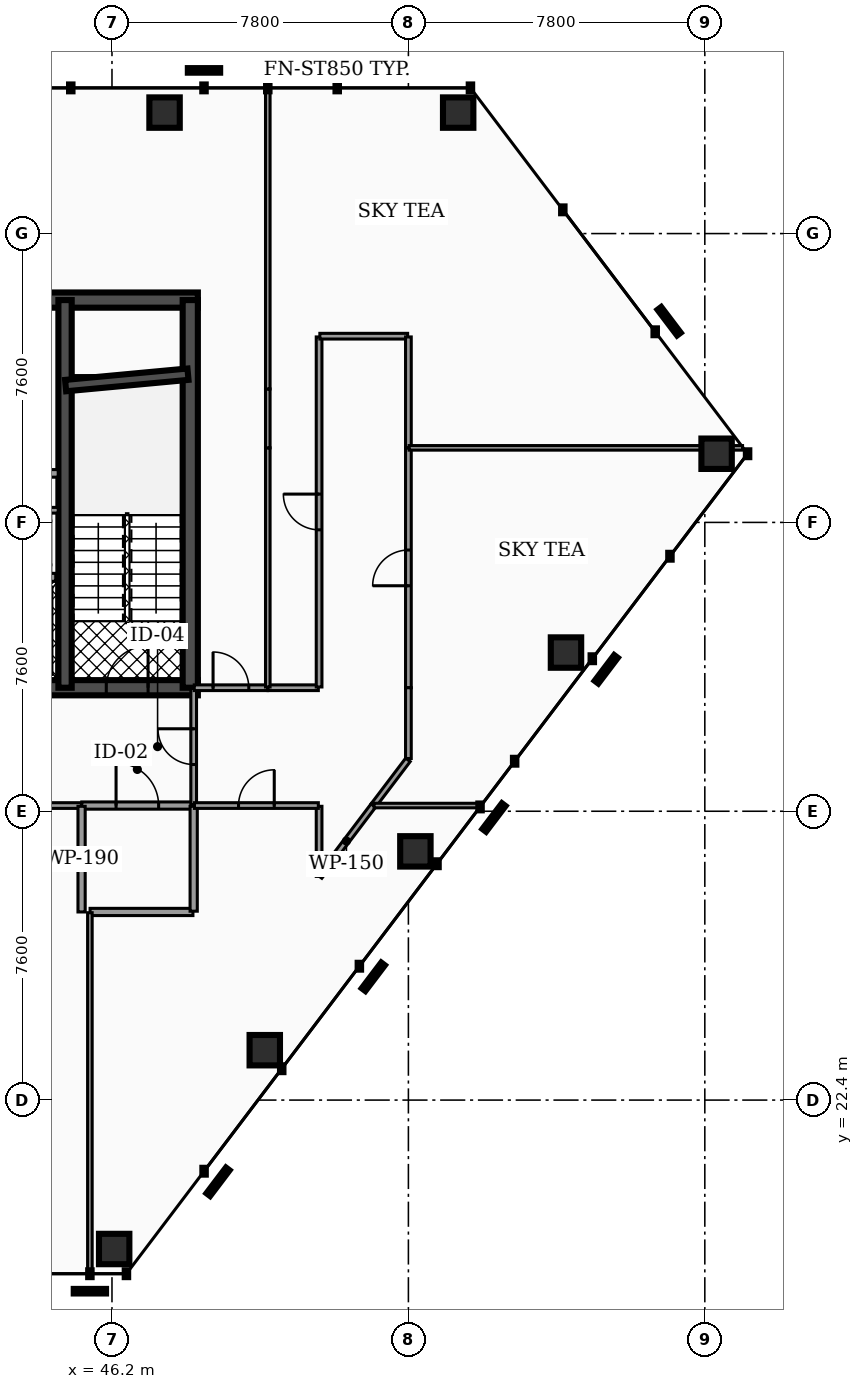
"""IFC4 building model, lengths in metres.
Left out: names, types, materials, properties, quantities, classifications, styles, units other than length and angle.
Written with IfcOpenShell. Run it as: python <this file> out.ifc"""

import sys

from ifc_helpers import new_model, si_unit, direction, frame, frame_2d, origin, origin_2d, place, context, subcontext, project, spatial, rectangle, hollow_rectangle, extrude, element, fill, save


model = new_model("IFC4")
c1 = context("Model", 3, precision=1e-05, world=origin(), true_north=direction((0.0, 1.0)))
c2 = subcontext(c1, "Body", "Model", "MODEL_VIEW")
j1 = project(units=[si_unit("LENGTHUNIT", "METRE"), si_unit("PLANEANGLEUNIT", "RADIAN")], contexts=[c1])
p1 = place(None, origin())
s1 = spatial("IfcSite", under=j1, at=p1, CompositionType="ELEMENT")
p2 = place(p1, origin())
s2 = spatial("IfcBuilding", under=s1, at=p2, CompositionType="ELEMENT")
p3 = place(p2, frame((0.0, 0.0, 153.34)))
s3 = spatial("IfcBuildingStorey", under=s2, at=p3, CompositionType="ELEMENT", Elevation=153.34)
p4 = place(p3, frame((28.4, 43.45, 0.0), z_axis=(0.0, 0.0, 1.0), x_axis=(1.0, 0.0, 0.0)))
e1 = element("IfcWall", 1, at=p4, inside=s3, PredefinedType="SHEAR", context=c2, shape_type="SweptSolid", body=[
    extrude(rectangle(XDim=20.06, YDim=0.4, at=frame_2d((10.03, 0.0))), origin(), (0.0, 0.0, 1.0), 3.5),
])
p5 = place(p3, frame((28.4, 33.25, 0.0), z_axis=(0.0, 0.0, 1.0), x_axis=(1.0, 0.0, 0.0)))
e2 = element("IfcWall", 2, at=p5, inside=s3, PredefinedType="SHEAR", context=c2, shape_type="SweptSolid", body=[
    extrude(rectangle(XDim=20.06, YDim=0.4, at=frame_2d((10.03, 0.0))), origin(), (0.0, 0.0, 1.0), 3.5),
])
p6 = place(p5, frame((4.03, 0.0, 0.0)))
e3 = element("IfcOpeningElement", 3, at=p6, cuts=e2, PredefinedType="OPENING", context=c2, shape_type="SweptSolid", body=[
    extrude(rectangle(XDim=1.1, YDim=2.15, at=frame_2d((0.55, 1.075))), frame((0.0, 0.21, 0.0), z_axis=(0.0, -1.0, 0.0), x_axis=(1.0, 0.0, 0.0)), (0.0, 0.0, 1.0), 0.42),
])
p7 = place(p5, frame((14.87, 0.0, 0.0)))
e4 = element("IfcOpeningElement", 4, at=p7, cuts=e2, PredefinedType="OPENING", context=c2, shape_type="SweptSolid", body=[
    extrude(rectangle(XDim=1.1, YDim=2.15, at=frame_2d((0.55, 1.075))), frame((0.0, 0.21, 0.0), z_axis=(0.0, -1.0, 0.0), x_axis=(1.0, 0.0, 0.0)), (0.0, 0.0, 1.0), 0.42),
])
p8 = place(p5, frame((5.95, 0.0, 0.0)))
e5 = element("IfcOpeningElement", 5, at=p8, cuts=e2, PredefinedType="OPENING", context=c2, shape_type="SweptSolid", body=[
    extrude(rectangle(XDim=1.0, YDim=2.1, at=frame_2d((0.5, 1.05))), frame((0.0, 0.21, 0.0), z_axis=(0.0, -1.0, 0.0), x_axis=(1.0, 0.0, 0.0)), (0.0, 0.0, 1.0), 0.42),
])
p9 = place(p5, frame((7.65, 0.0, 0.0)))
e6 = element("IfcOpeningElement", 6, at=p9, cuts=e2, PredefinedType="OPENING", context=c2, shape_type="SweptSolid", body=[
    extrude(rectangle(XDim=1.0, YDim=2.1, at=frame_2d((0.5, 1.05))), frame((0.0, 0.21, 0.0), z_axis=(0.0, -1.0, 0.0), x_axis=(1.0, 0.0, 0.0)), (0.0, 0.0, 1.0), 0.42),
])
p10 = place(p5, frame((1.31, 0.0, 0.0)))
e7 = element("IfcOpeningElement", 7, at=p10, cuts=e2, PredefinedType="OPENING", context=c2, shape_type="SweptSolid", body=[
    extrude(rectangle(XDim=1.1, YDim=2.2, at=frame_2d((0.55, 1.1))), frame((0.0, 0.21, 0.0), z_axis=(0.0, -1.0, 0.0), x_axis=(1.0, 0.0, 0.0)), (0.0, 0.0, 1.0), 0.42),
])
p11 = place(p5, frame((9.44, 0.0, 0.0)))
e8 = element("IfcOpeningElement", 8, at=p11, cuts=e2, PredefinedType="OPENING", context=c2, shape_type="SweptSolid", body=[
    extrude(rectangle(XDim=1.12, YDim=2.05, at=frame_2d((0.56, 1.025))), frame((0.0, 0.21, 0.0), z_axis=(0.0, -1.0, 0.0), x_axis=(1.0, 0.0, 0.0)), (0.0, 0.0, 1.0), 0.42),
])
p12 = place(p5, frame((17.65, 0.0, 0.0)))
e9 = element("IfcOpeningElement", 9, at=p12, cuts=e2, PredefinedType="OPENING", context=c2, shape_type="SweptSolid", body=[
    extrude(rectangle(XDim=1.1, YDim=2.2, at=frame_2d((0.55, 1.1))), frame((0.0, 0.21, 0.0), z_axis=(0.0, -1.0, 0.0), x_axis=(1.0, 0.0, 0.0)), (0.0, 0.0, 1.0), 0.42),
])
p13 = place(p3, frame((44.965, 33.25, 0.0), z_axis=(0.0, 0.0, 1.0), x_axis=(0.0, 1.0, 0.0)))
e10 = element("IfcWall", 10, at=p13, inside=s3, PredefinedType="SHEAR", context=c2, shape_type="SweptSolid", body=[
    extrude(rectangle(XDim=10.2, YDim=0.35, at=frame_2d((5.1, 0.0))), origin(), (0.0, 0.0, 1.0), 3.5),
])
p14 = place(p3, frame((48.26, 33.25, 0.0), z_axis=(0.0, 0.0, 1.0), x_axis=(0.0, 1.0, 0.0)))
e11 = element("IfcWall", 11, at=p14, inside=s3, PredefinedType="SHEAR", context=c2, shape_type="SweptSolid", body=[
    extrude(rectangle(XDim=10.2, YDim=0.4, at=frame_2d((5.1, 0.0))), origin(), (0.0, 0.0, 1.0), 3.5),
])
p15 = place(p3, frame((44.98, 41.2, 0.0), z_axis=(0.0, 0.0, 1.0), x_axis=(0.995686468965, 0.09278176286, 0.0)))
e12 = element("IfcWall", 12, at=p15, inside=s3, PredefinedType="SHEAR", context=c2, shape_type="SweptSolid", body=[
    extrude(rectangle(XDim=3.234, YDim=0.3, at=frame_2d((1.617, 0.0))), origin(), (0.0, 0.0, 1.0), 3.5),
])
p16 = place(p3, frame((55.31, 48.383, 0.0), z_axis=(0.122881872253, -0.033166309959, 0.991866947405), x_axis=(0.260579473479, 0.965452400692, 0.0)))
e13 = element("IfcColumn", 13, at=p16, inside=s3, PredefinedType="COLUMN", context=c2, shape_type="SweptSolid", body=[
    extrude(hollow_rectangle(XDim=0.8, YDim=0.8, WallThickness=0.04, at=origin_2d()), origin(), (0.0, 0.0, 1.0), 3.519),
])
p17 = place(p3, frame((47.583, 48.383, 0.0), z_axis=(0.057932366005, -0.033363458976, 0.997762857885), x_axis=(0.499059487101, 0.866567728648, 0.0)))
e14 = element("IfcColumn", 14, at=p17, inside=s3, PredefinedType="COLUMN", context=c2, shape_type="SweptSolid", body=[
    extrude(hollow_rectangle(XDim=0.8, YDim=0.8, WallThickness=0.04, at=origin_2d()), origin(), (0.0, 0.0, 1.0), 3.498),
])
p18 = place(p3, frame((46.258, 18.481, 0.0), z_axis=(-0.088935253172, -0.030852245227, 0.995559470704), x_axis=(0.327745748959, -0.944765962575, 0.0)))
e15 = element("IfcColumn", 15, at=p18, inside=s3, PredefinedType="COLUMN", context=c2, shape_type="SweptSolid", body=[
    extrude(hollow_rectangle(XDim=0.8, YDim=0.8, WallThickness=0.04, at=origin_2d()), origin(), (0.0, 0.0, 1.0), 3.506),
])
p19 = place(p3, frame((50.221, 23.713, 0.0), z_axis=(-0.06283418608, 0.003909682689, 0.998016322232), x_axis=(-0.062102120917, -0.998069800454, 0.0)))
e16 = element("IfcColumn", 16, at=p19, inside=s3, PredefinedType="COLUMN", context=c2, shape_type="SweptSolid", body=[
    extrude(hollow_rectangle(XDim=0.8, YDim=0.8, WallThickness=0.04, at=origin_2d()), origin(), (0.0, 0.0, 1.0), 3.497),
])
p20 = place(p3, frame((54.184, 28.944, 0.0), z_axis=(-0.036464506977, 0.03876973443, 0.998582619227), x_axis=(-0.728431141905, -0.685119019954, 0.0)))
e17 = element("IfcColumn", 17, at=p20, inside=s3, PredefinedType="COLUMN", context=c2, shape_type="SweptSolid", body=[
    extrude(hollow_rectangle(XDim=0.8, YDim=0.8, WallThickness=0.04, at=origin_2d()), origin(), (0.0, 0.0, 1.0), 3.495),
])
p21 = place(p3, frame((58.147, 34.176, 0.0), z_axis=(-0.010045726228, 0.073459373045, 0.997247614134), x_axis=(-0.990778565397, -0.135491085866, 0.0)))
e18 = element("IfcColumn", 18, at=p21, inside=s3, PredefinedType="COLUMN", context=c2, shape_type="SweptSolid", body=[
    extrude(hollow_rectangle(XDim=0.8, YDim=0.8, WallThickness=0.04, at=origin_2d()), origin(), (0.0, 0.0, 1.0), 3.5),
])
p22 = place(p3, frame((62.11, 39.407, 0.0), z_axis=(0.01620217777, 0.107852264901, 0.994034897975), x_axis=(-0.988903591842, 0.148558695615, 0.0)))
e19 = element("IfcColumn", 19, at=p22, inside=s3, PredefinedType="COLUMN", context=c2, shape_type="SweptSolid", body=[
    extrude(hollow_rectangle(XDim=0.8, YDim=0.8, WallThickness=0.04, at=origin_2d()), origin(), (0.0, 0.0, 1.0), 3.511),
])
p23 = place(p3, frame((42.92, 36.155, 0.0), z_axis=(0.0, 0.0, 1.0), x_axis=(1.0, 0.0, 0.0)))
e20 = element("IfcWall", 20, at=p23, inside=s3, PredefinedType="SOLIDWALL", context=c2, shape_type="SweptSolid", body=[
    extrude(rectangle(XDim=1.8, YDim=0.21, at=frame_2d((0.9, 0.0))), origin(), (0.0, 0.0, 1.0), 2.472),
])
p24 = place(p3, frame((39.25, 38.89, 0.0), z_axis=(0.0, 0.0, 1.0), x_axis=(1.0, 0.0, 0.0)))
e21 = element("IfcWall", 21, at=p24, inside=s3, PredefinedType="PARTITIONING", context=c2, shape_type="SweptSolid", body=[
    extrude(rectangle(XDim=5.535, YDim=0.2, at=frame_2d((2.768, 0.0))), origin(), (0.0, 0.0, 1.0), 2.447),
])
p25 = place(p24, frame((2.327, 0.0, 0.0)))
e22 = element("IfcOpeningElement", 22, at=p25, cuts=e21, PredefinedType="OPENING", context=c2, shape_type="SweptSolid", body=[
    extrude(rectangle(XDim=0.88, YDim=2.05, at=frame_2d((0.44, 1.025))), frame((0.0, 0.11, 0.0), z_axis=(0.0, -1.0, 0.0), x_axis=(1.0, 0.0, 0.0)), (0.0, 0.0, 1.0), 0.22),
])
p26 = place(p3, frame((41.62, 37.92, 0.0), z_axis=(0.0, 0.0, 1.0), x_axis=(1.0, 0.0, 0.0)))
e23 = element("IfcWall", 23, at=p26, inside=s3, PredefinedType="PARTITIONING", context=c2, shape_type="SweptSolid", body=[
    extrude(rectangle(XDim=3.165, YDim=0.15, at=frame_2d((1.583, 0.0))), origin(), (0.0, 0.0, 1.0), 2.447),
])
p27 = place(p26, frame((0.312, 0.0, 0.0)))
e24 = element("IfcOpeningElement", 24, at=p27, cuts=e23, PredefinedType="OPENING", context=c2, shape_type="SweptSolid", body=[
    extrude(rectangle(XDim=0.94, YDim=2.05, at=frame_2d((0.47, 1.025))), frame((0.0, 0.085, 0.0), z_axis=(0.0, -1.0, 0.0), x_axis=(1.0, 0.0, 0.0)), (0.0, 0.0, 1.0), 0.17),
])
p28 = place(p3, frame((45.405, 30.15, 0.0), z_axis=(0.0, 0.0, 1.0), x_axis=(1.0, 0.0, 0.0)))
e25 = element("IfcWall", 25, at=p28, inside=s3, PredefinedType="PARTITIONING", context=c2, shape_type="SweptSolid", body=[
    extrude(rectangle(XDim=2.925, YDim=0.19, at=frame_2d((1.462, 0.0))), origin(), (0.0, 0.0, 1.0), 2.447),
])
p29 = place(p28, frame((0.903, 0.0, 0.0)))
e26 = element("IfcOpeningElement", 26, at=p29, cuts=e25, PredefinedType="OPENING", context=c2, shape_type="SweptSolid", body=[
    extrude(rectangle(XDim=1.12, YDim=2.05, at=frame_2d((0.56, 1.025))), frame((0.0, 0.105, 0.0), z_axis=(0.0, -1.0, 0.0), x_axis=(1.0, 0.0, 0.0)), (0.0, 0.0, 1.0), 0.21),
])
p30 = place(p3, frame((48.35, 30.17, 0.0), z_axis=(0.0, 0.0, 1.0), x_axis=(0.0, 1.0, 0.0)))
e27 = element("IfcWall", 27, at=p30, inside=s3, PredefinedType="PARTITIONING", context=c2, shape_type="SweptSolid", body=[
    extrude(rectangle(XDim=3.06, YDim=0.15, at=frame_2d((1.53, 0.0))), origin(), (0.0, 0.0, 1.0), 2.447),
])
p31 = place(p30, frame((1.06, 0.0, 0.0)))
e28 = element("IfcOpeningElement", 28, at=p31, cuts=e27, PredefinedType="OPENING", context=c2, shape_type="SweptSolid", body=[
    extrude(rectangle(XDim=0.94, YDim=2.05, at=frame_2d((0.47, 1.025))), frame((0.0, 0.085, 0.0), z_axis=(0.0, -1.0, 0.0), x_axis=(1.0, 0.0, 0.0)), (0.0, 0.0, 1.0), 0.17),
])
p32 = place(p3, frame((35.385, 30.15, 0.0), z_axis=(0.0, 0.0, 1.0), x_axis=(1.0, 0.0, 0.0)))
e29 = element("IfcWall", 29, at=p32, inside=s3, PredefinedType="PARTITIONING", context=c2, shape_type="SweptSolid", body=[
    extrude(rectangle(XDim=10.01, YDim=0.15, at=frame_2d((5.005, 0.0))), origin(), (0.0, 0.0, 1.0), 2.447),
])
p33 = place(p32, frame((7.935, 0.0, 0.0)))
e30 = element("IfcOpeningElement", 30, at=p33, cuts=e29, PredefinedType="OPENING", context=c2, shape_type="SweptSolid", body=[
    extrude(rectangle(XDim=0.94, YDim=2.05, at=frame_2d((0.47, 1.025))), frame((0.0, 0.085, 0.0), z_axis=(0.0, -1.0, 0.0), x_axis=(1.0, 0.0, 0.0)), (0.0, 0.0, 1.0), 0.17),
])
p34 = place(p3, frame((45.4, 27.35, 0.0), z_axis=(0.0, 0.0, 1.0), x_axis=(0.0, 1.0, 0.0)))
e31 = element("IfcWall", 31, at=p34, inside=s3, PredefinedType="PARTITIONING", context=c2, shape_type="SweptSolid", body=[
    extrude(rectangle(XDim=2.78, YDim=0.19, at=frame_2d((1.39, 0.0))), origin(), (0.0, 0.0, 1.0), 2.447),
])
p35 = place(p3, frame((45.624, 27.35, 0.0), z_axis=(0.0, 0.0, 1.0), x_axis=(1.0, 0.0, 0.0)))
e32 = element("IfcWall", 32, at=p35, inside=s3, PredefinedType="PARTITIONING", context=c2, shape_type="SweptSolid", body=[
    extrude(rectangle(XDim=2.706, YDim=0.19, at=frame_2d((1.353, 0.0))), origin(), (0.0, 0.0, 1.0), 2.447),
])
p36 = place(p3, frame((48.35, 27.37, 0.0), z_axis=(0.0, 0.0, 1.0), x_axis=(0.0, 1.0, 0.0)))
e33 = element("IfcWall", 33, at=p36, inside=s3, PredefinedType="PARTITIONING", context=c2, shape_type="SweptSolid", body=[
    extrude(rectangle(XDim=2.76, YDim=0.19, at=frame_2d((1.38, 0.0))), origin(), (0.0, 0.0, 1.0), 2.447),
])
p37 = place(p3, frame((51.662, 28.282, 0.0), z_axis=(0.0, 0.0, 1.0), x_axis=(0.603811538878, 0.797127107504, 0.0)))
e34 = element("IfcWall", 34, at=p37, inside=s3, PredefinedType="PARTITIONING", context=c2, shape_type="SweptSolid", body=[
    extrude(rectangle(XDim=2.343, YDim=0.15, at=frame_2d((1.171, 0.0))), origin(), (0.0, 0.0, 1.0), 2.447),
])
p38 = place(p3, frame((51.65, 28.286, 0.0), z_axis=(0.0, 0.0, 1.0), x_axis=(0.0, 1.0, 0.0)))
e35 = element("IfcWall", 35, at=p38, inside=s3, PredefinedType="PARTITIONING", context=c2, shape_type="SweptSolid", body=[
    extrude(rectangle(XDim=1.844, YDim=0.15, at=frame_2d((0.922, 0.0))), origin(), (0.0, 0.0, 1.0), 2.447),
])
p39 = place(p3, frame((48.37, 30.15, 0.0), z_axis=(0.0, 0.0, 1.0), x_axis=(1.0, 0.0, 0.0)))
e36 = element("IfcWall", 36, at=p39, inside=s3, PredefinedType="PARTITIONING", context=c2, shape_type="SweptSolid", body=[
    extrude(rectangle(XDim=3.26, YDim=0.15, at=frame_2d((1.63, 0.0))), origin(), (0.0, 0.0, 1.0), 2.447),
])
p40 = place(p39, frame((1.16, 0.0, 0.0)))
e37 = element("IfcOpeningElement", 37, at=p40, cuts=e36, PredefinedType="OPENING", context=c2, shape_type="SweptSolid", body=[
    extrude(rectangle(XDim=0.94, YDim=2.05, at=frame_2d((0.47, 1.025))), frame((0.0, 0.085, 0.0), z_axis=(0.0, -1.0, 0.0), x_axis=(1.0, 0.0, 0.0)), (0.0, 0.0, 1.0), 0.17),
])
p41 = place(p3, frame((54.0, 33.25, 0.0), z_axis=(0.0, 0.0, 1.0), x_axis=(0.0, 1.0, 0.0)))
e38 = element("IfcWall", 38, at=p41, inside=s3, PredefinedType="PARTITIONING", context=c2, shape_type="SweptSolid", body=[
    extrude(rectangle(XDim=6.307, YDim=0.15, at=frame_2d((3.153, 0.0))), origin(), (0.0, 0.0, 1.0), 2.447),
])
p42 = place(p41, frame((2.683, 0.0, 0.0)))
e39 = element("IfcOpeningElement", 39, at=p42, cuts=e38, PredefinedType="OPENING", context=c2, shape_type="SweptSolid", body=[
    extrude(rectangle(XDim=0.94, YDim=2.05, at=frame_2d((0.47, 1.025))), frame((0.0, 0.085, 0.0), z_axis=(0.0, -1.0, 0.0), x_axis=(1.0, 0.0, 0.0)), (0.0, 0.0, 1.0), 0.17),
])
p43 = place(p3, frame((54.0, 31.388, 0.0), z_axis=(0.0, 0.0, 1.0), x_axis=(0.0, 1.0, 0.0)))
e40 = element("IfcWall", 40, at=p43, inside=s3, PredefinedType="PARTITIONING", context=c2, shape_type="SweptSolid", body=[
    extrude(rectangle(XDim=1.862, YDim=0.15, at=frame_2d((0.931, 0.0))), origin(), (0.0, 0.0, 1.0), 2.447),
])
p44 = place(p3, frame((53.08, 30.154, 0.0), z_axis=(0.0, 0.0, 1.0), x_axis=(0.603892095683, 0.797066080555, 0.0)))
e41 = element("IfcWall", 41, at=p44, inside=s3, PredefinedType="PARTITIONING", context=c2, shape_type="SweptSolid", body=[
    extrude(rectangle(XDim=1.503, YDim=0.15, at=frame_2d((0.751, 0.0))), origin(), (0.0, 0.0, 1.0), 2.447),
])
p45 = place(p3, frame((50.305, 33.25, 0.0), z_axis=(0.0, 0.0, 1.0), x_axis=(1.0, 0.0, 0.0)))
e42 = element("IfcWall", 42, at=p45, inside=s3, PredefinedType="PARTITIONING", context=c2, shape_type="SweptSolid", body=[
    extrude(rectangle(XDim=1.325, YDim=0.15, at=frame_2d((0.663, 0.0))), origin(), (0.0, 0.0, 1.0), 2.447),
])
p46 = place(p3, frame((51.65, 33.27, 0.0), z_axis=(0.0, 0.0, 1.0), x_axis=(0.0, 1.0, 0.0)))
e43 = element("IfcWall", 43, at=p46, inside=s3, PredefinedType="PARTITIONING", context=c2, shape_type="SweptSolid", body=[
    extrude(rectangle(XDim=9.21, YDim=0.15, at=frame_2d((4.605, 0.0))), origin(), (0.0, 0.0, 1.0), 2.447),
])
p47 = place(p46, frame((4.135, 0.0, 0.0)))
e44 = element("IfcOpeningElement", 44, at=p47, cuts=e43, PredefinedType="OPENING", context=c2, shape_type="SweptSolid", body=[
    extrude(rectangle(XDim=0.94, YDim=2.05, at=frame_2d((0.47, 1.025))), frame((0.0, 0.085, 0.0), z_axis=(0.0, -1.0, 0.0), x_axis=(1.0, 0.0, 0.0)), (0.0, 0.0, 1.0), 0.17),
])
p48 = place(p3, frame((51.67, 42.5, 0.0), z_axis=(0.0, 0.0, 1.0), x_axis=(1.0, 0.0, 0.0)))
e45 = element("IfcWall", 45, at=p48, inside=s3, PredefinedType="PARTITIONING", context=c2, shape_type="SweptSolid", body=[
    extrude(rectangle(XDim=2.31, YDim=0.15, at=frame_2d((1.155, 0.0))), origin(), (0.0, 0.0, 1.0), 2.447),
])
p49 = place(p3, frame((54.0, 39.567, 0.0), z_axis=(0.0, 0.0, 1.0), x_axis=(0.0, 1.0, 0.0)))
e46 = element("IfcWall", 46, at=p49, inside=s3, PredefinedType="PARTITIONING", context=c2, shape_type="SweptSolid", body=[
    extrude(rectangle(XDim=2.913, YDim=0.15, at=frame_2d((1.457, 0.0))), origin(), (0.0, 0.0, 1.0), 2.447),
])
p50 = place(p3, frame((48.365, 33.25, 0.0), z_axis=(0.0, 0.0, 1.0), x_axis=(1.0, 0.0, 0.0)))
e47 = element("IfcWall", 47, at=p50, inside=s3, PredefinedType="PARTITIONING", context=c2, shape_type="SweptSolid", body=[
    extrude(rectangle(XDim=1.93, YDim=0.15, at=frame_2d((0.965, 0.0))), origin(), (0.0, 0.0, 1.0), 2.447),
])
p51 = place(p50, frame((0.495, 0.0, 0.0)))
e48 = element("IfcOpeningElement", 48, at=p51, cuts=e47, PredefinedType="OPENING", context=c2, shape_type="SweptSolid", body=[
    extrude(rectangle(XDim=0.94, YDim=2.05, at=frame_2d((0.47, 1.025))), frame((0.0, 0.085, 0.0), z_axis=(0.0, -1.0, 0.0), x_axis=(1.0, 0.0, 0.0)), (0.0, 0.0, 1.0), 0.17),
])
p52 = place(p3, frame((45.619, 17.846, 0.0), z_axis=(0.0, 0.0, 1.0), x_axis=(0.0, 1.0, 0.0)))
e49 = element("IfcWall", 49, at=p52, inside=s3, PredefinedType="PARTITIONING", context=c2, shape_type="SweptSolid", body=[
    extrude(rectangle(XDim=9.484, YDim=0.12, at=frame_2d((4.742, 0.0))), origin(), (0.0, 0.0, 1.0), 2.447),
])
p53 = place(p3, frame((53.097, 30.15, 0.0), z_axis=(0.0, 0.0, 1.0), x_axis=(1.0, 0.0, 0.0)))
e50 = element("IfcWall", 50, at=p53, inside=s3, PredefinedType="PARTITIONING", context=c2, shape_type="SweptSolid", body=[
    extrude(rectangle(XDim=2.8, YDim=0.12, at=frame_2d((1.4, 0.0))), origin(), (0.0, 0.0, 1.0), 2.447),
])
p54 = place(p3, frame((54.02, 39.562, 0.0), z_axis=(0.0, 0.0, 1.0), x_axis=(1.0, 0.0, 0.0)))
e51 = element("IfcWall", 51, at=p54, inside=s3, PredefinedType="PARTITIONING", context=c2, shape_type="SweptSolid", body=[
    extrude(rectangle(XDim=8.773, YDim=0.12, at=frame_2d((4.387, 0.0))), origin(), (0.0, 0.0, 1.0), 2.447),
])
p55 = place(p3, frame((50.3, 33.27, 0.0), z_axis=(0.0, 0.0, 1.0), x_axis=(0.0, 1.0, 0.0)))
e52 = element("IfcWall", 52, at=p55, inside=s3, PredefinedType="PARTITIONING", context=c2, shape_type="SweptSolid", body=[
    extrude(rectangle(XDim=6.292, YDim=0.12, at=frame_2d((3.146, 0.0))), origin(), (0.0, 0.0, 1.0), 2.447),
])
p56 = place(p3, frame((50.3, 39.562, 0.0), z_axis=(0.0, 0.0, 1.0), x_axis=(0.0, 1.0, 0.0)))
e53 = element("IfcWall", 53, at=p56, inside=s3, PredefinedType="PARTITIONING", context=c2, shape_type="SweptSolid", body=[
    extrude(rectangle(XDim=1.55, YDim=0.12, at=frame_2d((0.775, 0.0))), origin(), (0.0, 0.0, 1.0), 2.447),
])
p57 = place(p3, frame((50.3, 41.112, 0.0), z_axis=(0.0, 0.0, 1.0), x_axis=(0.0, 1.0, 0.0)))
e54 = element("IfcWall", 54, at=p57, inside=s3, PredefinedType="PARTITIONING", context=c2, shape_type="SweptSolid", body=[
    extrude(rectangle(XDim=7.907, YDim=0.12, at=frame_2d((3.953, 0.0))), origin(), (0.0, 0.0, 1.0), 2.447),
])
p58 = place(p12, origin())
e55 = element("IfcDoor", 55, at=p58, inside=s3, OperationType="SINGLE_SWING_RIGHT", PredefinedType="DOOR", context=c2, shape_type="SweptSolid", body=[
    extrude(rectangle(XDim=1.1, YDim=2.2, at=frame_2d((0.55, 1.1))), frame((0.0, 0.025, 0.0), z_axis=(0.0, -1.0, 0.0), x_axis=(1.0, 0.0, 0.0)), (0.0, 0.0, 1.0), 0.05),
])
fill(e9, e55)
p59 = place(p29, origin())
e56 = element("IfcDoor", 56, at=p59, inside=s3, OperationType="SINGLE_SWING_LEFT", PredefinedType="DOOR", context=c2, shape_type="SweptSolid", body=[
    extrude(rectangle(XDim=1.12, YDim=2.05, at=frame_2d((0.56, 1.025))), frame((0.0, 0.025, 0.0), z_axis=(0.0, -1.0, 0.0), x_axis=(1.0, 0.0, 0.0)), (0.0, 0.0, 1.0), 0.05),
])
fill(e26, e56)
p60 = place(p31, origin())
e57 = element("IfcDoor", 57, at=p60, inside=s3, OperationType="SINGLE_SWING_RIGHT", PredefinedType="DOOR", context=c2, shape_type="SweptSolid", body=[
    extrude(rectangle(XDim=0.94, YDim=2.05, at=frame_2d((0.47, 1.025))), frame((0.0, 0.025, 0.0), z_axis=(0.0, -1.0, 0.0), x_axis=(1.0, 0.0, 0.0)), (0.0, 0.0, 1.0), 0.05),
])
fill(e28, e57)
p61 = place(p40, origin())
e58 = element("IfcDoor", 58, at=p61, inside=s3, OperationType="SINGLE_SWING_RIGHT", PredefinedType="DOOR", context=c2, shape_type="SweptSolid", body=[
    extrude(rectangle(XDim=0.94, YDim=2.05, at=frame_2d((0.47, 1.025))), frame((0.0, 0.025, 0.0), z_axis=(0.0, -1.0, 0.0), x_axis=(1.0, 0.0, 0.0)), (0.0, 0.0, 1.0), 0.05),
])
fill(e37, e58)
p62 = place(p42, origin())
e59 = element("IfcDoor", 59, at=p62, inside=s3, OperationType="SINGLE_SWING_LEFT", PredefinedType="DOOR", context=c2, shape_type="SweptSolid", body=[
    extrude(rectangle(XDim=0.94, YDim=2.05, at=frame_2d((0.47, 1.025))), frame((0.0, 0.025, 0.0), z_axis=(0.0, -1.0, 0.0), x_axis=(1.0, 0.0, 0.0)), (0.0, 0.0, 1.0), 0.05),
])
fill(e39, e59)
p63 = place(p47, origin())
e60 = element("IfcDoor", 60, at=p63, inside=s3, OperationType="SINGLE_SWING_RIGHT", PredefinedType="DOOR", context=c2, shape_type="SweptSolid", body=[
    extrude(rectangle(XDim=0.94, YDim=2.05, at=frame_2d((0.47, 1.025))), frame((0.0, 0.025, 0.0), z_axis=(0.0, -1.0, 0.0), x_axis=(1.0, 0.0, 0.0)), (0.0, 0.0, 1.0), 0.05),
])
fill(e44, e60)
p64 = place(p51, origin())
e61 = element("IfcDoor", 61, at=p64, inside=s3, OperationType="SINGLE_SWING_LEFT", PredefinedType="DOOR", context=c2, shape_type="SweptSolid", body=[
    extrude(rectangle(XDim=0.94, YDim=2.05, at=frame_2d((0.47, 1.025))), frame((0.0, 0.025, 0.0), z_axis=(0.0, -1.0, 0.0), x_axis=(1.0, 0.0, 0.0)), (0.0, 0.0, 1.0), 0.05),
])
fill(e48, e61)
save(model, sys.argv[1])
